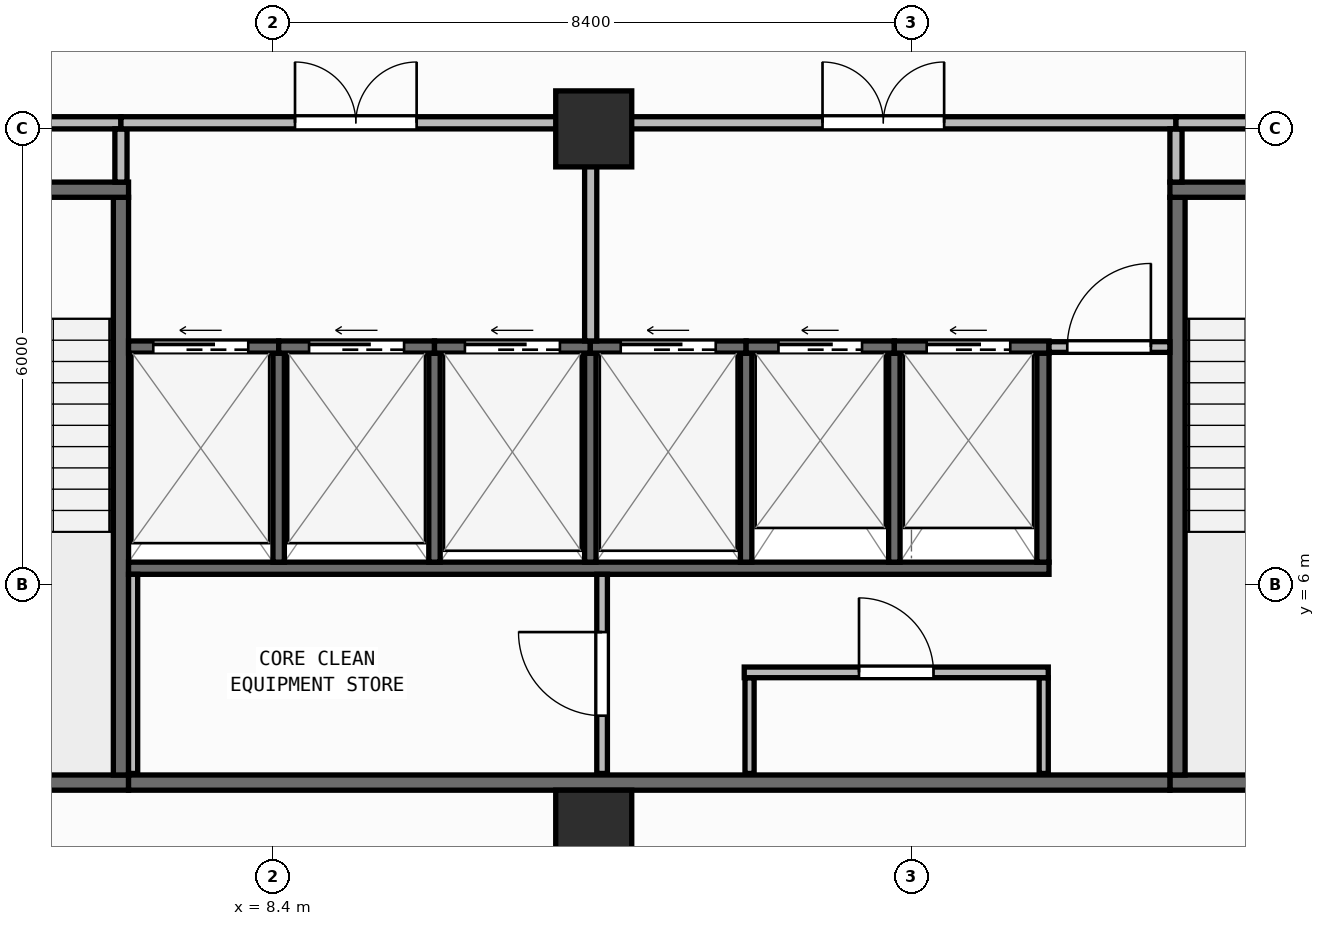
"""IFC4 building model, lengths in metres.
Left out: names, types, materials, properties, quantities, classifications, styles, units other than length and angle.
Written with IfcOpenShell. Run it as: python <this file> out.ifc"""

import sys

from ifc_helpers import new_model, si_unit, direction, frame, frame_2d, origin, origin_2d, place, context, subcontext, project, spatial, rectangle, extrude, element, fill, save


model = new_model("IFC4")
c1 = context("Model", 3, precision=1e-05, world=origin(), true_north=direction((0.0, 1.0)))
c2 = subcontext(c1, "Body", "Model", "MODEL_VIEW")
j1 = project(units=[si_unit("LENGTHUNIT", "METRE"), si_unit("PLANEANGLEUNIT", "RADIAN")], contexts=[c1])
p1 = place(None, origin())
s1 = spatial("IfcSite", under=j1, at=p1, CompositionType="ELEMENT")
p2 = place(p1, origin())
s2 = spatial("IfcBuilding", under=s1, at=p2, CompositionType="ELEMENT")
p3 = place(p2, frame((0.0, 0.0, 196.05)))
s3 = spatial("IfcBuildingStorey", under=s2, at=p3, CompositionType="ELEMENT", Elevation=196.05)
for number, where, z_axis, x_axis in (
    (1, (12.62, 2.8, 0.0), (0.0, 0.0, 1.0), (1.0, 0.0, 0.0)),
    (2, (12.62, 12.0, 0.0), (0.0, 0.0, 1.0), (1.0, 0.0, 0.0)),
):
    element("IfcColumn", number, at=place(p3, frame(where, z_axis=z_axis, x_axis=x_axis)), inside=s3, PredefinedType="COLUMN", context=c2, shape_type="SweptSolid", body=[
        extrude(rectangle(XDim=1.0, YDim=1.0, at=origin_2d()), origin(), (0.0, 0.0, 1.0), 3.95),
    ])
p4 = place(p3, frame((2.66, 0.174, 0.0), z_axis=(0.0, 0.0, 1.0), x_axis=(0.996634028439, 0.081979347142, 0.0)))
e3 = element("IfcWall", 3, at=p4, inside=s3, PredefinedType="STANDARD", context=c2, shape_type="SweptSolid", body=[
    extrude(rectangle(XDim=46.035, YDim=0.26, at=frame_2d((23.018, 0.0))), origin(), (0.0, 0.0, 1.0), 3.71),
])
p5 = place(p4, frame((21.817, 0.0, 0.9)))
e4 = element("IfcOpeningElement", 4, at=p5, cuts=e3, PredefinedType="OPENING", context=c2, shape_type="SweptSolid", body=[
    extrude(rectangle(XDim=2.4, YDim=1.65, at=frame_2d((1.2, 0.825))), frame((0.0, 0.14, 0.0), z_axis=(0.0, -1.0, 0.0), x_axis=(1.0, 0.0, 0.0)), (0.0, 0.0, 1.0), 0.28),
])
p6 = place(p3, frame((2.8, 3.4, 0.0), z_axis=(0.0, 0.0, 1.0), x_axis=(1.0, 0.0, 0.0)))
e5 = element("IfcWall", 5, at=p6, inside=s3, PredefinedType="SHEAR", context=c2, shape_type="SweptSolid", body=[
    extrude(rectangle(XDim=3.7, YDim=0.2, at=frame_2d((1.85, 0.0))), origin(), (0.0, 0.0, 1.0), 3.71),
])
p7 = place(p3, frame((6.4, 3.5, 0.0), z_axis=(0.0, 0.0, 1.0), x_axis=(0.0, 1.0, 0.0)))
e6 = element("IfcWall", 6, at=p7, inside=s3, PredefinedType="SHEAR", context=c2, shape_type="SweptSolid", body=[
    extrude(rectangle(XDim=7.6, YDim=0.2, at=frame_2d((3.8, 0.0))), origin(), (0.0, 0.0, 1.0), 3.71),
])
p8 = place(p3, frame((2.8, 11.2, 0.0), z_axis=(0.0, 0.0, 1.0), x_axis=(1.0, 0.0, 0.0)))
e7 = element("IfcWall", 7, at=p8, inside=s3, PredefinedType="SHEAR", context=c2, shape_type="SweptSolid", body=[
    extrude(rectangle(XDim=3.7, YDim=0.2, at=frame_2d((1.85, 0.0))), origin(), (0.0, 0.0, 1.0), 3.71),
])
p9 = place(p8, frame((1.2, 0.0, 0.0)))
e8 = element("IfcOpeningElement", 8, at=p9, cuts=e7, PredefinedType="OPENING", context=c2, shape_type="SweptSolid", body=[
    extrude(rectangle(XDim=1.3, YDim=2.15, at=frame_2d((0.65, 1.075))), frame((0.0, 0.11, 0.0), z_axis=(0.0, -1.0, 0.0), x_axis=(1.0, 0.0, 0.0)), (0.0, 0.0, 1.0), 0.22),
])
p10 = place(p3, frame((20.2, 3.4, 0.0), z_axis=(0.0, 0.0, 1.0), x_axis=(1.0, 0.0, 0.0)))
e9 = element("IfcWall", 9, at=p10, inside=s3, PredefinedType="SHEAR", context=c2, shape_type="SweptSolid", body=[
    extrude(rectangle(XDim=3.7, YDim=0.2, at=frame_2d((1.85, 0.0))), origin(), (0.0, 0.0, 1.0), 3.71),
])
p11 = place(p3, frame((20.3, 3.5, 0.0), z_axis=(0.0, 0.0, 1.0), x_axis=(0.0, 1.0, 0.0)))
e10 = element("IfcWall", 10, at=p11, inside=s3, PredefinedType="SHEAR", context=c2, shape_type="SweptSolid", body=[
    extrude(rectangle(XDim=7.6, YDim=0.2, at=frame_2d((3.8, 0.0))), origin(), (0.0, 0.0, 1.0), 3.71),
])
p12 = place(p3, frame((20.2, 11.2, 0.0), z_axis=(0.0, 0.0, 1.0), x_axis=(1.0, 0.0, 0.0)))
e11 = element("IfcWall", 11, at=p12, inside=s3, PredefinedType="SHEAR", context=c2, shape_type="SweptSolid", body=[
    extrude(rectangle(XDim=3.7, YDim=0.2, at=frame_2d((1.85, 0.0))), origin(), (0.0, 0.0, 1.0), 3.71),
])
p13 = place(p12, frame((1.2, 0.0, 0.0)))
e12 = element("IfcOpeningElement", 12, at=p13, cuts=e11, PredefinedType="OPENING", context=c2, shape_type="SweptSolid", body=[
    extrude(rectangle(XDim=1.3, YDim=2.15, at=frame_2d((0.65, 1.075))), frame((0.0, 0.11, 0.0), z_axis=(0.0, -1.0, 0.0), x_axis=(1.0, 0.0, 0.0)), (0.0, 0.0, 1.0), 0.22),
])
p14 = place(p3, frame((6.5, 3.4, 0.0), z_axis=(0.0, 0.0, 1.0), x_axis=(1.0, 0.0, 0.0)))
e13 = element("IfcWall", 13, at=p14, inside=s3, PredefinedType="SHEAR", context=c2, shape_type="SweptSolid", body=[
    extrude(rectangle(XDim=13.7, YDim=0.2, at=frame_2d((6.85, 0.0))), origin(), (0.0, 0.0, 1.0), 3.71),
])
p15 = place(p3, frame((6.5, 6.22, 0.0), z_axis=(0.0, 0.0, 1.0), x_axis=(1.0, 0.0, 0.0)))
e14 = element("IfcWall", 14, at=p15, inside=s3, PredefinedType="SHEAR", context=c2, shape_type="SweptSolid", body=[
    extrude(rectangle(XDim=12.11, YDim=0.16, at=frame_2d((6.055, 0.0))), origin(), (0.0, 0.0, 1.0), 3.71),
])
p16 = place(p3, frame((18.53, 6.3, 0.0), z_axis=(0.0, 0.0, 1.0), x_axis=(0.0, 1.0, 0.0)))
e15 = element("IfcWall", 15, at=p16, inside=s3, PredefinedType="SHEAR", context=c2, shape_type="SweptSolid", body=[
    extrude(rectangle(XDim=2.75, YDim=0.16, at=frame_2d((1.375, 0.0))), origin(), (0.0, 0.0, 1.0), 3.71),
])
for number, where, z_axis, x_axis in (
    (16, (8.475, 6.3, 0.0), (0.0, 0.0, 1.0), (0.0, 1.0, 0.0)),
    (17, (10.525, 6.3, 0.0), (0.0, 0.0, 1.0), (0.0, 1.0, 0.0)),
    (18, (12.575, 6.3, 0.0), (0.0, 0.0, 1.0), (0.0, 1.0, 0.0)),
    (19, (14.625, 6.3, 0.0), (0.0, 0.0, 1.0), (0.0, 1.0, 0.0)),
    (20, (16.575, 6.3, 0.0), (0.0, 0.0, 1.0), (0.0, 1.0, 0.0)),
):
    element("IfcWall", number, at=place(p3, frame(where, z_axis=z_axis, x_axis=x_axis)), inside=s3, PredefinedType="SHEAR", context=c2, shape_type="SweptSolid", body=[
        extrude(rectangle(XDim=2.75, YDim=0.15, at=frame_2d((1.375, 0.0))), origin(), (0.0, 0.0, 1.0), 3.71),
    ])
p17 = place(p3, frame((6.5, 9.13, 0.0), z_axis=(0.0, 0.0, 1.0), x_axis=(1.0, 0.0, 0.0)))
e21 = element("IfcWall", 21, at=p17, inside=s3, PredefinedType="SHEAR", context=c2, shape_type="SweptSolid", body=[
    extrude(rectangle(XDim=1.975, YDim=0.16, at=frame_2d((0.988, 0.0))), origin(), (0.0, 0.0, 1.0), 3.71),
])
p18 = place(p17, frame((0.325, 0.0, 0.0)))
e22 = element("IfcOpeningElement", 22, at=p18, cuts=e21, PredefinedType="OPENING", context=c2, shape_type="SweptSolid", body=[
    extrude(rectangle(XDim=1.25, YDim=2.15, at=frame_2d((0.625, 1.075))), frame((0.0, 0.09, 0.0), z_axis=(0.0, -1.0, 0.0), x_axis=(1.0, 0.0, 0.0)), (0.0, 0.0, 1.0), 0.18),
])
p19 = place(p3, frame((8.475, 9.13, 0.0), z_axis=(0.0, 0.0, 1.0), x_axis=(1.0, 0.0, 0.0)))
e23 = element("IfcWall", 23, at=p19, inside=s3, PredefinedType="SHEAR", context=c2, shape_type="SweptSolid", body=[
    extrude(rectangle(XDim=2.05, YDim=0.16, at=frame_2d((1.025, 0.0))), origin(), (0.0, 0.0, 1.0), 3.71),
])
p20 = place(p19, frame((0.4, 0.0, 0.0)))
e24 = element("IfcOpeningElement", 24, at=p20, cuts=e23, PredefinedType="OPENING", context=c2, shape_type="SweptSolid", body=[
    extrude(rectangle(XDim=1.25, YDim=2.15, at=frame_2d((0.625, 1.075))), frame((0.0, 0.09, 0.0), z_axis=(0.0, -1.0, 0.0), x_axis=(1.0, 0.0, 0.0)), (0.0, 0.0, 1.0), 0.18),
])
p21 = place(p3, frame((10.525, 9.13, 0.0), z_axis=(0.0, 0.0, 1.0), x_axis=(1.0, 0.0, 0.0)))
e25 = element("IfcWall", 25, at=p21, inside=s3, PredefinedType="SHEAR", context=c2, shape_type="SweptSolid", body=[
    extrude(rectangle(XDim=2.05, YDim=0.16, at=frame_2d((1.025, 0.0))), origin(), (0.0, 0.0, 1.0), 3.71),
])
p22 = place(p21, frame((0.4, 0.0, 0.0)))
e26 = element("IfcOpeningElement", 26, at=p22, cuts=e25, PredefinedType="OPENING", context=c2, shape_type="SweptSolid", body=[
    extrude(rectangle(XDim=1.25, YDim=2.15, at=frame_2d((0.625, 1.075))), frame((0.0, 0.09, 0.0), z_axis=(0.0, -1.0, 0.0), x_axis=(1.0, 0.0, 0.0)), (0.0, 0.0, 1.0), 0.18),
])
p23 = place(p3, frame((12.575, 9.13, 0.0), z_axis=(0.0, 0.0, 1.0), x_axis=(1.0, 0.0, 0.0)))
e27 = element("IfcWall", 27, at=p23, inside=s3, PredefinedType="SHEAR", context=c2, shape_type="SweptSolid", body=[
    extrude(rectangle(XDim=2.05, YDim=0.16, at=frame_2d((1.025, 0.0))), origin(), (0.0, 0.0, 1.0), 3.71),
])
p24 = place(p23, frame((0.4, 0.0, 0.0)))
e28 = element("IfcOpeningElement", 28, at=p24, cuts=e27, PredefinedType="OPENING", context=c2, shape_type="SweptSolid", body=[
    extrude(rectangle(XDim=1.25, YDim=2.15, at=frame_2d((0.625, 1.075))), frame((0.0, 0.09, 0.0), z_axis=(0.0, -1.0, 0.0), x_axis=(1.0, 0.0, 0.0)), (0.0, 0.0, 1.0), 0.18),
])
p25 = place(p3, frame((14.625, 9.13, 0.0), z_axis=(0.0, 0.0, 1.0), x_axis=(1.0, 0.0, 0.0)))
e29 = element("IfcWall", 29, at=p25, inside=s3, PredefinedType="SHEAR", context=c2, shape_type="SweptSolid", body=[
    extrude(rectangle(XDim=1.95, YDim=0.16, at=frame_2d((0.975, 0.0))), origin(), (0.0, 0.0, 1.0), 3.71),
])
p26 = place(p25, frame((0.425, 0.0, 0.0)))
e30 = element("IfcOpeningElement", 30, at=p26, cuts=e29, PredefinedType="OPENING", context=c2, shape_type="SweptSolid", body=[
    extrude(rectangle(XDim=1.1, YDim=2.15, at=frame_2d((0.55, 1.075))), frame((0.0, 0.09, 0.0), z_axis=(0.0, -1.0, 0.0), x_axis=(1.0, 0.0, 0.0)), (0.0, 0.0, 1.0), 0.18),
])
p27 = place(p3, frame((16.575, 9.13, 0.0), z_axis=(0.0, 0.0, 1.0), x_axis=(1.0, 0.0, 0.0)))
e31 = element("IfcWall", 31, at=p27, inside=s3, PredefinedType="SHEAR", context=c2, shape_type="SweptSolid", body=[
    extrude(rectangle(XDim=2.035, YDim=0.16, at=frame_2d((1.018, 0.0))), origin(), (0.0, 0.0, 1.0), 3.71),
])
p28 = place(p27, frame((0.425, 0.0, 0.0)))
e32 = element("IfcOpeningElement", 32, at=p28, cuts=e31, PredefinedType="OPENING", context=c2, shape_type="SweptSolid", body=[
    extrude(rectangle(XDim=1.1, YDim=2.15, at=frame_2d((0.55, 1.075))), frame((0.0, 0.09, 0.0), z_axis=(0.0, -1.0, 0.0), x_axis=(1.0, 0.0, 0.0)), (0.0, 0.0, 1.0), 0.18),
])
p29 = place(p3, frame((6.56, 3.52, 0.0), z_axis=(0.0, 0.0, 1.0), x_axis=(0.0, 1.0, 0.0)))
e33 = element("IfcWall", 33, at=p29, inside=s3, PredefinedType="PARTITIONING", context=c2, shape_type="SweptSolid", body=[
    extrude(rectangle(XDim=2.62, YDim=0.12, at=frame_2d((1.31, 0.0))), origin(), (0.0, 0.0, 1.0), 3.71),
])
p30 = place(p3, frame((12.73, 3.52, 0.0), z_axis=(0.0, 0.0, 1.0), x_axis=(0.0, 1.0, 0.0)))
e34 = element("IfcWall", 34, at=p30, inside=s3, PredefinedType="PARTITIONING", context=c2, shape_type="SweptSolid", body=[
    extrude(rectangle(XDim=2.62, YDim=0.14, at=frame_2d((1.31, 0.0))), origin(), (0.0, 0.0, 1.0), 3.71),
])
p31 = place(p30, frame((0.76, 0.0, 0.0)))
e35 = element("IfcOpeningElement", 35, at=p31, cuts=e34, PredefinedType="OPENING", context=c2, shape_type="SweptSolid", body=[
    extrude(rectangle(XDim=1.1, YDim=2.1, at=frame_2d((0.55, 1.05))), frame((0.0, 0.08, 0.0), z_axis=(0.0, -1.0, 0.0), x_axis=(1.0, 0.0, 0.0)), (0.0, 0.0, 1.0), 0.16),
])
for number, where, z_axis, x_axis in (
    (36, (14.67, 3.52, 0.0), (0.0, 0.0, 1.0), (0.0, 1.0, 0.0)),
    (37, (18.54, 3.52, 0.0), (0.0, 0.0, 1.0), (0.0, 1.0, 0.0)),
):
    element("IfcWall", number, at=place(p3, frame(where, z_axis=z_axis, x_axis=x_axis)), inside=s3, PredefinedType="PARTITIONING", context=c2, shape_type="SweptSolid", body=[
        extrude(rectangle(XDim=1.26, YDim=0.12, at=frame_2d((0.63, 0.0))), origin(), (0.0, 0.0, 1.0), 3.71),
    ])
p32 = place(p3, frame((14.6, 4.85, 0.0), z_axis=(0.0, 0.0, 1.0), x_axis=(1.0, 0.0, 0.0)))
e38 = element("IfcWall", 38, at=p32, inside=s3, PredefinedType="PARTITIONING", context=c2, shape_type="SweptSolid", body=[
    extrude(rectangle(XDim=4.0, YDim=0.14, at=frame_2d((2.0, 0.0))), origin(), (0.0, 0.0, 1.0), 3.71),
])
p33 = place(p32, frame((1.51, 0.0, 0.0)))
e39 = element("IfcOpeningElement", 39, at=p33, cuts=e38, PredefinedType="OPENING", context=c2, shape_type="SweptSolid", body=[
    extrude(rectangle(XDim=0.98, YDim=2.1, at=frame_2d((0.49, 1.05))), frame((0.0, 0.08, 0.0), z_axis=(0.0, -1.0, 0.0), x_axis=(1.0, 0.0, 0.0)), (0.0, 0.0, 1.0), 0.16),
])
p34 = place(p3, frame((18.61, 9.13, 0.0), z_axis=(0.0, 0.0, 1.0), x_axis=(1.0, 0.0, 0.0)))
e40 = element("IfcWall", 40, at=p34, inside=s3, PredefinedType="PARTITIONING", context=c2, shape_type="SweptSolid", body=[
    extrude(rectangle(XDim=1.59, YDim=0.14, at=frame_2d((0.795, 0.0))), origin(), (0.0, 0.0, 1.0), 3.71),
])
p35 = place(p34, frame((0.24, 0.0, 0.0)))
e41 = element("IfcOpeningElement", 41, at=p35, cuts=e40, PredefinedType="OPENING", context=c2, shape_type="SweptSolid", body=[
    extrude(rectangle(XDim=1.1, YDim=2.1, at=frame_2d((0.55, 1.05))), frame((0.0, 0.08, 0.0), z_axis=(0.0, -1.0, 0.0), x_axis=(1.0, 0.0, 0.0)), (0.0, 0.0, 1.0), 0.16),
])
p36 = place(p3, frame((2.8, 12.08, 0.0), z_axis=(0.0, 0.0, 1.0), x_axis=(1.0, 0.0, 0.0)))
e42 = element("IfcWall", 42, at=p36, inside=s3, PredefinedType="PARTITIONING", context=c2, shape_type="SweptSolid", body=[
    extrude(rectangle(XDim=3.6, YDim=0.16, at=frame_2d((1.8, 0.0))), origin(), (0.0, 0.0, 1.0), 3.152),
])
p37 = place(p36, frame((1.0, 0.0, 0.0)))
e43 = element("IfcOpeningElement", 43, at=p37, cuts=e42, PredefinedType="OPENING", context=c2, shape_type="SweptSolid", body=[
    extrude(rectangle(XDim=1.6, YDim=2.05, at=frame_2d((0.8, 1.025))), frame((0.0, 0.09, 0.0), z_axis=(0.0, -1.0, 0.0), x_axis=(1.0, 0.0, 0.0)), (0.0, 0.0, 1.0), 0.18),
])
p38 = place(p3, frame((6.4, 11.3, 0.0), z_axis=(0.0, 0.0, 1.0), x_axis=(0.0, 1.0, 0.0)))
e44 = element("IfcWall", 44, at=p38, inside=s3, PredefinedType="PARTITIONING", context=c2, shape_type="SweptSolid", body=[
    extrude(rectangle(XDim=0.7, YDim=0.16, at=frame_2d((0.35, 0.0))), origin(), (0.0, 0.0, 1.0), 3.71),
])
p39 = place(p3, frame((6.4, 12.08, 0.0), z_axis=(0.0, 0.0, 1.0), x_axis=(1.0, 0.0, 0.0)))
e45 = element("IfcWall", 45, at=p39, inside=s3, PredefinedType="PARTITIONING", context=c2, shape_type="SweptSolid", body=[
    extrude(rectangle(XDim=6.18, YDim=0.16, at=frame_2d((3.09, 0.0))), origin(), (0.0, 0.0, 1.0), 3.152),
])
p40 = place(p39, frame((2.29, 0.0, 0.0)))
e46 = element("IfcOpeningElement", 46, at=p40, cuts=e45, PredefinedType="OPENING", context=c2, shape_type="SweptSolid", body=[
    extrude(rectangle(XDim=1.6, YDim=2.05, at=frame_2d((0.8, 1.025))), frame((0.0, 0.09, 0.0), z_axis=(0.0, -1.0, 0.0), x_axis=(1.0, 0.0, 0.0)), (0.0, 0.0, 1.0), 0.18),
])
p41 = place(p3, frame((12.58, 9.21, 0.0), z_axis=(0.0, 0.0, 1.0), x_axis=(0.0, 1.0, 0.0)))
e47 = element("IfcWall", 47, at=p41, inside=s3, PredefinedType="PARTITIONING", context=c2, shape_type="SweptSolid", body=[
    extrude(rectangle(XDim=2.79, YDim=0.16, at=frame_2d((1.395, 0.0))), origin(), (0.0, 0.0, 1.0), 3.71),
])
p42 = place(p3, frame((12.58, 12.08, 0.0), z_axis=(0.0, 0.0, 1.0), x_axis=(1.0, 0.0, 0.0)))
e48 = element("IfcWall", 48, at=p42, inside=s3, PredefinedType="PARTITIONING", context=c2, shape_type="SweptSolid", body=[
    extrude(rectangle(XDim=7.7, YDim=0.16, at=frame_2d((3.85, 0.0))), origin(), (0.0, 0.0, 1.0), 3.152),
])
p43 = place(p42, frame((3.05, 0.0, 0.0)))
e49 = element("IfcOpeningElement", 49, at=p43, cuts=e48, PredefinedType="OPENING", context=c2, shape_type="SweptSolid", body=[
    extrude(rectangle(XDim=1.6, YDim=2.05, at=frame_2d((0.8, 1.025))), frame((0.0, 0.09, 0.0), z_axis=(0.0, -1.0, 0.0), x_axis=(1.0, 0.0, 0.0)), (0.0, 0.0, 1.0), 0.18),
])
p44 = place(p3, frame((20.28, 11.3, 0.0), z_axis=(0.0, 0.0, 1.0), x_axis=(0.0, 1.0, 0.0)))
e50 = element("IfcWall", 50, at=p44, inside=s3, PredefinedType="PARTITIONING", context=c2, shape_type="SweptSolid", body=[
    extrude(rectangle(XDim=0.7, YDim=0.16, at=frame_2d((0.35, 0.0))), origin(), (0.0, 0.0, 1.0), 3.71),
])
p45 = place(p3, frame((20.28, 12.08, 0.0), z_axis=(0.0, 0.0, 1.0), x_axis=(1.0, 0.0, 0.0)))
e51 = element("IfcWall", 51, at=p45, inside=s3, PredefinedType="PARTITIONING", context=c2, shape_type="SweptSolid", body=[
    extrude(rectangle(XDim=3.62, YDim=0.16, at=frame_2d((1.81, 0.0))), origin(), (0.0, 0.0, 1.0), 3.152),
])
p46 = place(p45, frame((1.01, 0.0, 0.0)))
e52 = element("IfcOpeningElement", 52, at=p46, cuts=e51, PredefinedType="OPENING", context=c2, shape_type="SweptSolid", body=[
    extrude(rectangle(XDim=1.6, YDim=2.05, at=frame_2d((0.8, 1.025))), frame((0.0, 0.09, 0.0), z_axis=(0.0, -1.0, 0.0), x_axis=(1.0, 0.0, 0.0)), (0.0, 0.0, 1.0), 0.18),
])
p47 = place(p18, origin())
e53 = element("IfcDoor", 53, at=p47, inside=s3, OperationType="SLIDING_TO_LEFT", PredefinedType="DOOR", context=c2, shape_type="SweptSolid", body=[
    extrude(rectangle(XDim=1.25, YDim=2.15, at=frame_2d((0.625, 1.075))), frame((0.0, 0.025, 0.0), z_axis=(0.0, -1.0, 0.0), x_axis=(1.0, 0.0, 0.0)), (0.0, 0.0, 1.0), 0.05),
])
fill(e22, e53)
p48 = place(p20, origin())
e54 = element("IfcDoor", 54, at=p48, inside=s3, OperationType="SLIDING_TO_LEFT", PredefinedType="DOOR", context=c2, shape_type="SweptSolid", body=[
    extrude(rectangle(XDim=1.25, YDim=2.15, at=frame_2d((0.625, 1.075))), frame((0.0, 0.025, 0.0), z_axis=(0.0, -1.0, 0.0), x_axis=(1.0, 0.0, 0.0)), (0.0, 0.0, 1.0), 0.05),
])
fill(e24, e54)
p49 = place(p22, origin())
e55 = element("IfcDoor", 55, at=p49, inside=s3, OperationType="SLIDING_TO_LEFT", PredefinedType="DOOR", context=c2, shape_type="SweptSolid", body=[
    extrude(rectangle(XDim=1.25, YDim=2.15, at=frame_2d((0.625, 1.075))), frame((0.0, 0.025, 0.0), z_axis=(0.0, -1.0, 0.0), x_axis=(1.0, 0.0, 0.0)), (0.0, 0.0, 1.0), 0.05),
])
fill(e26, e55)
p50 = place(p24, origin())
e56 = element("IfcDoor", 56, at=p50, inside=s3, OperationType="SLIDING_TO_LEFT", PredefinedType="DOOR", context=c2, shape_type="SweptSolid", body=[
    extrude(rectangle(XDim=1.25, YDim=2.15, at=frame_2d((0.625, 1.075))), frame((0.0, 0.025, 0.0), z_axis=(0.0, -1.0, 0.0), x_axis=(1.0, 0.0, 0.0)), (0.0, 0.0, 1.0), 0.05),
])
fill(e28, e56)
p51 = place(p26, origin())
e57 = element("IfcDoor", 57, at=p51, inside=s3, OperationType="SLIDING_TO_LEFT", PredefinedType="DOOR", context=c2, shape_type="SweptSolid", body=[
    extrude(rectangle(XDim=1.1, YDim=2.15, at=frame_2d((0.55, 1.075))), frame((0.0, 0.025, 0.0), z_axis=(0.0, -1.0, 0.0), x_axis=(1.0, 0.0, 0.0)), (0.0, 0.0, 1.0), 0.05),
])
fill(e30, e57)
p52 = place(p28, origin())
e58 = element("IfcDoor", 58, at=p52, inside=s3, OperationType="SLIDING_TO_LEFT", PredefinedType="DOOR", context=c2, shape_type="SweptSolid", body=[
    extrude(rectangle(XDim=1.1, YDim=2.15, at=frame_2d((0.55, 1.075))), frame((0.0, 0.025, 0.0), z_axis=(0.0, -1.0, 0.0), x_axis=(1.0, 0.0, 0.0)), (0.0, 0.0, 1.0), 0.05),
])
fill(e32, e58)
p53 = place(p31, origin())
e59 = element("IfcDoor", 59, at=p53, inside=s3, OperationType="SINGLE_SWING_RIGHT", PredefinedType="DOOR", context=c2, shape_type="SweptSolid", body=[
    extrude(rectangle(XDim=1.1, YDim=2.1, at=frame_2d((0.55, 1.05))), frame((0.0, 0.025, 0.0), z_axis=(0.0, -1.0, 0.0), x_axis=(1.0, 0.0, 0.0)), (0.0, 0.0, 1.0), 0.05),
])
fill(e35, e59)
p54 = place(p33, origin())
e60 = element("IfcDoor", 60, at=p54, inside=s3, OperationType="SINGLE_SWING_LEFT", PredefinedType="DOOR", context=c2, shape_type="SweptSolid", body=[
    extrude(rectangle(XDim=0.98, YDim=2.1, at=frame_2d((0.49, 1.05))), frame((0.0, 0.025, 0.0), z_axis=(0.0, -1.0, 0.0), x_axis=(1.0, 0.0, 0.0)), (0.0, 0.0, 1.0), 0.05),
])
fill(e39, e60)
p55 = place(p35, origin())
e61 = element("IfcDoor", 61, at=p55, inside=s3, OperationType="SINGLE_SWING_RIGHT", PredefinedType="DOOR", context=c2, shape_type="SweptSolid", body=[
    extrude(rectangle(XDim=1.1, YDim=2.1, at=frame_2d((0.55, 1.05))), frame((0.0, 0.025, 0.0), z_axis=(0.0, -1.0, 0.0), x_axis=(1.0, 0.0, 0.0)), (0.0, 0.0, 1.0), 0.05),
])
fill(e41, e61)
p56 = place(p40, origin())
e62 = element("IfcDoor", 62, at=p56, inside=s3, OperationType="DOUBLE_DOOR_SINGLE_SWING", PredefinedType="DOOR", context=c2, shape_type="SweptSolid", body=[
    extrude(rectangle(XDim=1.6, YDim=2.05, at=frame_2d((0.8, 1.025))), frame((0.0, 0.025, 0.0), z_axis=(0.0, -1.0, 0.0), x_axis=(1.0, 0.0, 0.0)), (0.0, 0.0, 1.0), 0.05),
])
fill(e46, e62)
p57 = place(p43, origin())
e63 = element("IfcDoor", 63, at=p57, inside=s3, OperationType="DOUBLE_DOOR_SINGLE_SWING", PredefinedType="DOOR", context=c2, shape_type="SweptSolid", body=[
    extrude(rectangle(XDim=1.6, YDim=2.05, at=frame_2d((0.8, 1.025))), frame((0.0, 0.025, 0.0), z_axis=(0.0, -1.0, 0.0), x_axis=(1.0, 0.0, 0.0)), (0.0, 0.0, 1.0), 0.05),
])
fill(e49, e63)
save(model, sys.argv[1])
